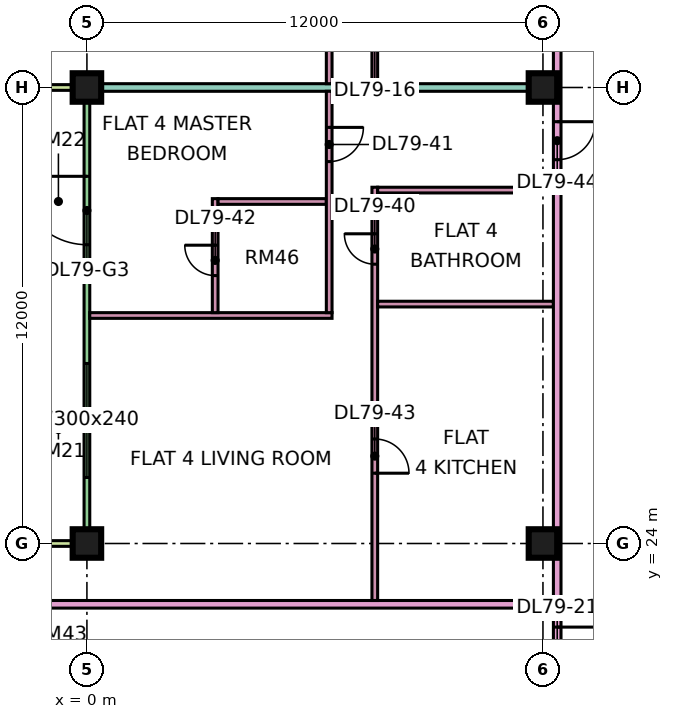
"""IFC4 building model, lengths in metres.
Left out: names, types, materials, properties, quantities, classifications, styles, units other than length and angle.
Written with IfcOpenShell. Run it as: python <this file> out.ifc"""

import sys

from ifc_helpers import new_model, si_unit, direction, frame, frame_2d, origin, origin_2d, place, context, subcontext, project, spatial, rectangle, extrude, element, fill, save


model = new_model("IFC4")
c1 = context("Model", 3, precision=1e-05, world=origin(), true_north=direction((0.0, 1.0)))
c2 = subcontext(c1, "Body", "Model", "MODEL_VIEW")
j1 = project(units=[si_unit("LENGTHUNIT", "METRE"), si_unit("PLANEANGLEUNIT", "RADIAN")], contexts=[c1])
p1 = place(None, origin())
s1 = spatial("IfcSite", under=j1, at=p1, CompositionType="ELEMENT")
p2 = place(p1, origin())
s2 = spatial("IfcBuilding", under=s1, at=p2, CompositionType="ELEMENT")
p3 = place(p2, frame((0.0, 0.0, 342.65)))
s3 = spatial("IfcBuildingStorey", under=s2, at=p3, CompositionType="ELEMENT", Elevation=342.65)
p4 = place(p3, frame((0.0, 24.0, 0.0), z_axis=(0.0, 0.0, 1.0), x_axis=(1.0, 0.0, 0.0)))
e1 = element("IfcColumn", 1, at=p4, inside=s3, PredefinedType="COLUMN", context=c2, shape_type="SweptSolid", body=[
    extrude(rectangle(XDim=0.75, YDim=0.75, at=origin_2d()), origin(), (0.0, 0.0, 1.0), 3.75),
])
p5 = place(p3, frame((0.0, 36.0, 0.0), z_axis=(0.0, 0.0, 1.0), x_axis=(1.0, 0.0, 0.0)))
e2 = element("IfcColumn", 2, at=p5, inside=s3, PredefinedType="COLUMN", context=c2, shape_type="SweptSolid", body=[
    extrude(rectangle(XDim=0.75, YDim=0.75, at=origin_2d()), origin(), (0.0, 0.0, 1.0), 3.75),
])
for number, where, z_axis, x_axis in (
    (3, (12.0, 24.0, 0.0), (0.0, 0.0, 1.0), (1.0, 0.0, 0.0)),
    (4, (12.0, 36.0, 0.0), (0.0, 0.0, 1.0), (1.0, 0.0, 0.0)),
):
    element("IfcColumn", number, at=place(p3, frame(where, z_axis=z_axis, x_axis=x_axis)), inside=s3, PredefinedType="COLUMN", context=c2, shape_type="SweptSolid", body=[
        extrude(rectangle(XDim=0.75, YDim=0.75, at=origin_2d()), origin(), (0.0, 0.0, 1.0), 3.75),
    ])
p6 = place(p3, frame((0.0, 35.925, 0.0), z_axis=(0.0, 0.0, 1.0), x_axis=(0.0, -1.0, 0.0)))
e5 = element("IfcWall", 5, at=p6, inside=s3, PredefinedType="SOLIDWALL", context=c2, shape_type="SweptSolid", body=[
    extrude(rectangle(XDim=11.85, YDim=0.15, at=frame_2d((5.925, 0.0))), origin(), (0.0, 0.0, 1.0), 3.35),
])
p7 = place(p6, frame((2.262, 0.0, 0.0)))
e6 = element("IfcOpeningElement", 6, at=p7, cuts=e5, PredefinedType="OPENING", context=c2, shape_type="SweptSolid", body=[
    extrude(rectangle(XDim=1.8, YDim=2.4, at=frame_2d((0.9, 1.2))), frame((0.0, 0.085, 0.0), z_axis=(0.0, -1.0, 0.0), x_axis=(1.0, 0.0, 0.0)), (0.0, 0.0, 1.0), 0.17),
])
p8 = place(p6, frame((7.188, 0.0, 0.45)))
e7 = element("IfcOpeningElement", 7, at=p8, cuts=e5, PredefinedType="OPENING", context=c2, shape_type="SweptSolid", body=[
    extrude(rectangle(XDim=3.0, YDim=2.4, at=frame_2d((1.5, 1.2))), frame((0.0, 0.085, 0.0), z_axis=(0.0, -1.0, 0.0), x_axis=(1.0, 0.0, 0.0)), (0.0, 0.0, 1.0), 0.17),
])
for number, where, z_axis, x_axis in (
    (8, (-1.5, 36.0, 0.0), (0.0, 0.0, 1.0), (1.0, 0.0, 0.0)),
    (9, (-1.5, 24.0, 0.0), (0.0, 0.0, 1.0), (1.0, 0.0, 0.0)),
):
    element("IfcWall", number, at=place(p3, frame(where, z_axis=z_axis, x_axis=x_axis)), inside=s3, PredefinedType="SOLIDWALL", context=c2, shape_type="SweptSolid", body=[
        extrude(rectangle(XDim=1.5, YDim=0.15, at=frame_2d((0.75, 0.0))), origin(), (0.0, 0.0, 1.0), 3.35),
    ])
p9 = place(p3, frame((-1.35, 22.4, 0.0), z_axis=(0.0, 0.0, 1.0), x_axis=(1.0, 0.0, 0.0)))
e10 = element("IfcWall", 10, at=p9, inside=s3, PredefinedType="PARTITIONING", context=c2, shape_type="SweptSolid", body=[
    extrude(rectangle(XDim=13.625, YDim=0.2, at=frame_2d((6.812, 0.0))), origin(), (0.0, 0.0, 1.0), 3.35),
])
e11 = element("IfcWall", 11, at=p5, inside=s3, PredefinedType="PARTITIONING", context=c2, shape_type="SweptSolid", body=[
    extrude(rectangle(XDim=12.275, YDim=0.2, at=frame_2d((6.137, 0.0))), origin(), (0.0, 0.0, 1.0), 3.35),
])
p10 = place(p3, frame((0.074, 30.0, 0.0), z_axis=(0.0, 0.0, 1.0), x_axis=(1.0, 0.0, 0.0)))
e12 = element("IfcWall", 12, at=p10, inside=s3, PredefinedType="PARTITIONING", context=c2, shape_type="SweptSolid", body=[
    extrude(rectangle(XDim=6.376, YDim=0.15, at=frame_2d((3.188, 0.0))), origin(), (0.0, 0.0, 1.0), 3.35),
])
p11 = place(p3, frame((3.375, 30.075, 0.0), z_axis=(0.0, 0.0, 1.0), x_axis=(0.0, 1.0, 0.0)))
e13 = element("IfcWall", 13, at=p11, inside=s3, PredefinedType="PARTITIONING", context=c2, shape_type="SweptSolid", body=[
    extrude(rectangle(XDim=3.0, YDim=0.15, at=frame_2d((1.5, 0.0))), origin(), (0.0, 0.0, 1.0), 3.35),
])
p12 = place(p11, frame((0.975, 0.0, 0.0)))
e14 = element("IfcOpeningElement", 14, at=p12, cuts=e13, PredefinedType="OPENING", context=c2, shape_type="SweptSolid", body=[
    extrude(rectangle(XDim=0.8, YDim=2.1, at=frame_2d((0.4, 1.05))), frame((0.0, 0.085, 0.0), z_axis=(0.0, -1.0, 0.0), x_axis=(1.0, 0.0, 0.0)), (0.0, 0.0, 1.0), 0.17),
])
p13 = place(p3, frame((3.45, 33.0, 0.0), z_axis=(0.0, 0.0, 1.0), x_axis=(1.0, 0.0, 0.0)))
e15 = element("IfcWall", 15, at=p13, inside=s3, PredefinedType="PARTITIONING", context=c2, shape_type="SweptSolid", body=[
    extrude(rectangle(XDim=2.85, YDim=0.15, at=frame_2d((1.425, 0.0))), origin(), (0.0, 0.0, 1.0), 3.35),
])
p14 = place(p3, frame((6.375, 30.075, 0.0), z_axis=(0.0, 0.0, 1.0), x_axis=(0.0, 1.0, 0.0)))
e16 = element("IfcWall", 16, at=p14, inside=s3, PredefinedType="PARTITIONING", context=c2, shape_type="SweptSolid", body=[
    extrude(rectangle(XDim=5.825, YDim=0.15, at=frame_2d((2.913, 0.0))), origin(), (0.0, 0.0, 1.0), 3.35),
])
p15 = place(p14, frame((3.975, 0.0, 0.0)))
e17 = element("IfcOpeningElement", 17, at=p15, cuts=e16, PredefinedType="OPENING", context=c2, shape_type="SweptSolid", body=[
    extrude(rectangle(XDim=0.9, YDim=2.1, at=frame_2d((0.45, 1.05))), frame((0.0, 0.085, 0.0), z_axis=(0.0, -1.0, 0.0), x_axis=(1.0, 0.0, 0.0)), (0.0, 0.0, 1.0), 0.17),
])
p16 = place(p3, frame((6.375, 36.1, 0.0), z_axis=(0.0, 0.0, 1.0), x_axis=(0.0, 1.0, 0.0)))
e18 = element("IfcWall", 18, at=p16, inside=s3, PredefinedType="PARTITIONING", context=c2, shape_type="SweptSolid", body=[
    extrude(rectangle(XDim=2.95, YDim=0.15, at=frame_2d((1.475, 0.0))), origin(), (0.0, 0.0, 1.0), 3.35),
])
p17 = place(p16, frame((0.95, 0.0, 0.0)))
e19 = element("IfcOpeningElement", 19, at=p17, cuts=e18, PredefinedType="OPENING", context=c2, shape_type="SweptSolid", body=[
    extrude(rectangle(XDim=0.9, YDim=2.1, at=frame_2d((0.45, 1.05))), frame((0.0, 0.085, 0.0), z_axis=(0.0, -1.0, 0.0), x_axis=(1.0, 0.0, 0.0)), (0.0, 0.0, 1.0), 0.17),
])
p18 = place(p3, frame((7.575, 22.5, 0.0), z_axis=(0.0, 0.0, 1.0), x_axis=(0.0, 1.0, 0.0)))
e20 = element("IfcWall", 20, at=p18, inside=s3, PredefinedType="PARTITIONING", context=c2, shape_type="SweptSolid", body=[
    extrude(rectangle(XDim=10.875, YDim=0.15, at=frame_2d((5.438, 0.0))), origin(), (0.0, 0.0, 1.0), 3.35),
])
p19 = place(p18, frame((8.85, 0.0, 0.0)))
e21 = element("IfcOpeningElement", 21, at=p19, cuts=e20, PredefinedType="OPENING", context=c2, shape_type="SweptSolid", body=[
    extrude(rectangle(XDim=0.8, YDim=2.1, at=frame_2d((0.4, 1.05))), frame((0.0, 0.085, 0.0), z_axis=(0.0, -1.0, 0.0), x_axis=(1.0, 0.0, 0.0)), (0.0, 0.0, 1.0), 0.17),
])
p20 = place(p18, frame((3.35, 0.0, 0.0)))
e22 = element("IfcOpeningElement", 22, at=p20, cuts=e20, PredefinedType="OPENING", context=c2, shape_type="SweptSolid", body=[
    extrude(rectangle(XDim=0.9, YDim=2.1, at=frame_2d((0.45, 1.05))), frame((0.0, 0.085, 0.0), z_axis=(0.0, -1.0, 0.0), x_axis=(1.0, 0.0, 0.0)), (0.0, 0.0, 1.0), 0.17),
])
p21 = place(p3, frame((7.575, 36.1, 0.0), z_axis=(0.0, 0.0, 1.0), x_axis=(0.0, 1.0, 0.0)))
e23 = element("IfcWall", 23, at=p21, inside=s3, PredefinedType="PARTITIONING", context=c2, shape_type="SweptSolid", body=[
    extrude(rectangle(XDim=14.65, YDim=0.15, at=frame_2d((7.325, 0.0))), origin(), (0.0, 0.0, 1.0), 3.35),
])
p22 = place(p21, frame((4.25, 0.0, 0.0)))
e24 = element("IfcOpeningElement", 24, at=p22, cuts=e23, PredefinedType="OPENING", context=c2, shape_type="SweptSolid", body=[
    extrude(rectangle(XDim=0.8, YDim=2.1, at=frame_2d((0.4, 1.05))), frame((0.0, 0.085, 0.0), z_axis=(0.0, -1.0, 0.0), x_axis=(1.0, 0.0, 0.0)), (0.0, 0.0, 1.0), 0.17),
])
p23 = place(p21, frame((0.95, 0.0, 0.0)))
e25 = element("IfcOpeningElement", 25, at=p23, cuts=e23, PredefinedType="OPENING", context=c2, shape_type="SweptSolid", body=[
    extrude(rectangle(XDim=0.9, YDim=2.1, at=frame_2d((0.45, 1.05))), frame((0.0, 0.085, 0.0), z_axis=(0.0, -1.0, 0.0), x_axis=(1.0, 0.0, 0.0)), (0.0, 0.0, 1.0), 0.17),
])
p24 = place(p21, frame((7.25, 0.0, 0.0)))
e26 = element("IfcOpeningElement", 26, at=p24, cuts=e23, PredefinedType="OPENING", context=c2, shape_type="SweptSolid", body=[
    extrude(rectangle(XDim=0.8, YDim=2.1, at=frame_2d((0.4, 1.05))), frame((0.0, 0.085, 0.0), z_axis=(0.0, -1.0, 0.0), x_axis=(1.0, 0.0, 0.0)), (0.0, 0.0, 1.0), 0.17),
])
for number, where, z_axis, x_axis in (
    (27, (7.65, 30.3, 0.0), (0.0, 0.0, 1.0), (1.0, 0.0, 0.0)),
    (28, (7.65, 33.3, 0.0), (0.0, 0.0, 1.0), (1.0, 0.0, 0.0)),
):
    element("IfcWall", number, at=place(p3, frame(where, z_axis=z_axis, x_axis=x_axis)), inside=s3, PredefinedType="PARTITIONING", context=c2, shape_type="SweptSolid", body=[
        extrude(rectangle(XDim=4.625, YDim=0.15, at=frame_2d((2.312, 0.0))), origin(), (0.0, 0.0, 1.0), 3.35),
    ])
p25 = place(p3, frame((12.375, 20.0, 0.0), z_axis=(0.0, 0.0, 1.0), x_axis=(0.0, 1.0, 0.0)))
e29 = element("IfcWall", 29, at=p25, inside=s3, PredefinedType="PARTITIONING", context=c2, shape_type="SweptSolid", body=[
    extrude(rectangle(XDim=34.0, YDim=0.2, at=frame_2d((17.0, 0.0))), origin(), (0.0, 0.0, 1.0), 3.35),
])
p26 = place(p25, frame((31.8, 0.0, 0.0)))
e30 = element("IfcOpeningElement", 30, at=p26, cuts=e29, PredefinedType="OPENING", context=c2, shape_type="SweptSolid", body=[
    extrude(rectangle(XDim=1.0, YDim=2.1, at=frame_2d((0.5, 1.05))), frame((0.0, 0.11, 0.0), z_axis=(0.0, -1.0, 0.0), x_axis=(1.0, 0.0, 0.0)), (0.0, 0.0, 1.0), 0.22),
])
p27 = place(p25, frame((0.6, 0.0, 0.0)))
e31 = element("IfcOpeningElement", 31, at=p27, cuts=e29, PredefinedType="OPENING", context=c2, shape_type="SweptSolid", body=[
    extrude(rectangle(XDim=1.2, YDim=2.1, at=frame_2d((0.6, 1.05))), frame((0.0, 0.11, 0.0), z_axis=(0.0, -1.0, 0.0), x_axis=(1.0, 0.0, 0.0)), (0.0, 0.0, 1.0), 0.22),
])
p28 = place(p25, frame((14.1, 0.0, 0.0)))
e32 = element("IfcOpeningElement", 32, at=p28, cuts=e29, PredefinedType="OPENING", context=c2, shape_type="SweptSolid", body=[
    extrude(rectangle(XDim=1.0, YDim=2.1, at=frame_2d((0.5, 1.05))), frame((0.0, 0.11, 0.0), z_axis=(0.0, -1.0, 0.0), x_axis=(1.0, 0.0, 0.0)), (0.0, 0.0, 1.0), 0.22),
])
p29 = place(p7, frame((1.8, 0.0, 0.0), z_axis=(0.0, 0.0, 1.0), x_axis=(-1.0, 0.0, 0.0)))
e33 = element("IfcDoor", 33, at=p29, inside=s3, OperationType="DOUBLE_DOOR_SINGLE_SWING", PredefinedType="DOOR", context=c2, shape_type="SweptSolid", body=[
    extrude(rectangle(XDim=1.8, YDim=2.4, at=frame_2d((0.9, 1.2))), frame((0.0, 0.025, 0.0), z_axis=(0.0, -1.0, 0.0), x_axis=(1.0, 0.0, 0.0)), (0.0, 0.0, 1.0), 0.05),
])
fill(e6, e33)
p30 = place(p8, origin())
e34 = element("IfcWindow", 34, at=p30, inside=s3, PartitioningType="SINGLE_PANEL", PredefinedType="WINDOW", context=c2, shape_type="SweptSolid", body=[
    extrude(rectangle(XDim=3.0, YDim=2.4, at=frame_2d((1.5, 1.2))), frame((0.0, 0.03, 0.0), z_axis=(0.0, -1.0, 0.0), x_axis=(1.0, 0.0, 0.0)), (0.0, 0.0, 1.0), 0.06),
])
fill(e7, e34)
p31 = place(p27, origin())
e35 = element("IfcDoor", 35, at=p31, inside=s3, OperationType="SINGLE_SWING_RIGHT", PredefinedType="DOOR", context=c2, shape_type="SweptSolid", body=[
    extrude(rectangle(XDim=1.2, YDim=2.1, at=frame_2d((0.6, 1.05))), frame((0.0, 0.025, 0.0), z_axis=(0.0, -1.0, 0.0), x_axis=(1.0, 0.0, 0.0)), (0.0, 0.0, 1.0), 0.05),
])
fill(e31, e35)
p32 = place(p19, frame((0.8, 0.0, 0.0), z_axis=(0.0, 0.0, 1.0), x_axis=(-1.0, 0.0, 0.0)))
e36 = element("IfcDoor", 36, at=p32, inside=s3, OperationType="SINGLE_SWING_RIGHT", PredefinedType="DOOR", context=c2, shape_type="SweptSolid", body=[
    extrude(rectangle(XDim=0.8, YDim=2.1, at=frame_2d((0.4, 1.05))), frame((0.0, 0.025, 0.0), z_axis=(0.0, -1.0, 0.0), x_axis=(1.0, 0.0, 0.0)), (0.0, 0.0, 1.0), 0.05),
])
fill(e21, e36)
p33 = place(p15, origin())
e37 = element("IfcDoor", 37, at=p33, inside=s3, OperationType="SINGLE_SWING_RIGHT", PredefinedType="DOOR", context=c2, shape_type="SweptSolid", body=[
    extrude(rectangle(XDim=0.9, YDim=2.1, at=frame_2d((0.45, 1.05))), frame((0.0, 0.025, 0.0), z_axis=(0.0, -1.0, 0.0), x_axis=(1.0, 0.0, 0.0)), (0.0, 0.0, 1.0), 0.05),
])
fill(e17, e37)
p34 = place(p12, frame((0.8, 0.0, 0.0), z_axis=(0.0, 0.0, 1.0), x_axis=(-1.0, 0.0, 0.0)))
e38 = element("IfcDoor", 38, at=p34, inside=s3, OperationType="SINGLE_SWING_RIGHT", PredefinedType="DOOR", context=c2, shape_type="SweptSolid", body=[
    extrude(rectangle(XDim=0.8, YDim=2.1, at=frame_2d((0.4, 1.05))), frame((0.0, 0.025, 0.0), z_axis=(0.0, -1.0, 0.0), x_axis=(1.0, 0.0, 0.0)), (0.0, 0.0, 1.0), 0.05),
])
fill(e14, e38)
p35 = place(p20, frame((0.9, 0.0, 0.0), z_axis=(0.0, 0.0, 1.0), x_axis=(-1.0, 0.0, 0.0)))
e39 = element("IfcDoor", 39, at=p35, inside=s3, OperationType="SINGLE_SWING_LEFT", PredefinedType="DOOR", context=c2, shape_type="SweptSolid", body=[
    extrude(rectangle(XDim=0.9, YDim=2.1, at=frame_2d((0.45, 1.05))), frame((0.0, 0.025, 0.0), z_axis=(0.0, -1.0, 0.0), x_axis=(1.0, 0.0, 0.0)), (0.0, 0.0, 1.0), 0.05),
])
fill(e22, e39)
p36 = place(p28, origin())
e40 = element("IfcDoor", 40, at=p36, inside=s3, OperationType="SINGLE_SWING_RIGHT", PredefinedType="DOOR", context=c2, shape_type="SweptSolid", body=[
    extrude(rectangle(XDim=1.0, YDim=2.1, at=frame_2d((0.5, 1.05))), frame((0.0, 0.025, 0.0), z_axis=(0.0, -1.0, 0.0), x_axis=(1.0, 0.0, 0.0)), (0.0, 0.0, 1.0), 0.05),
])
fill(e32, e40)
save(model, sys.argv[1])
